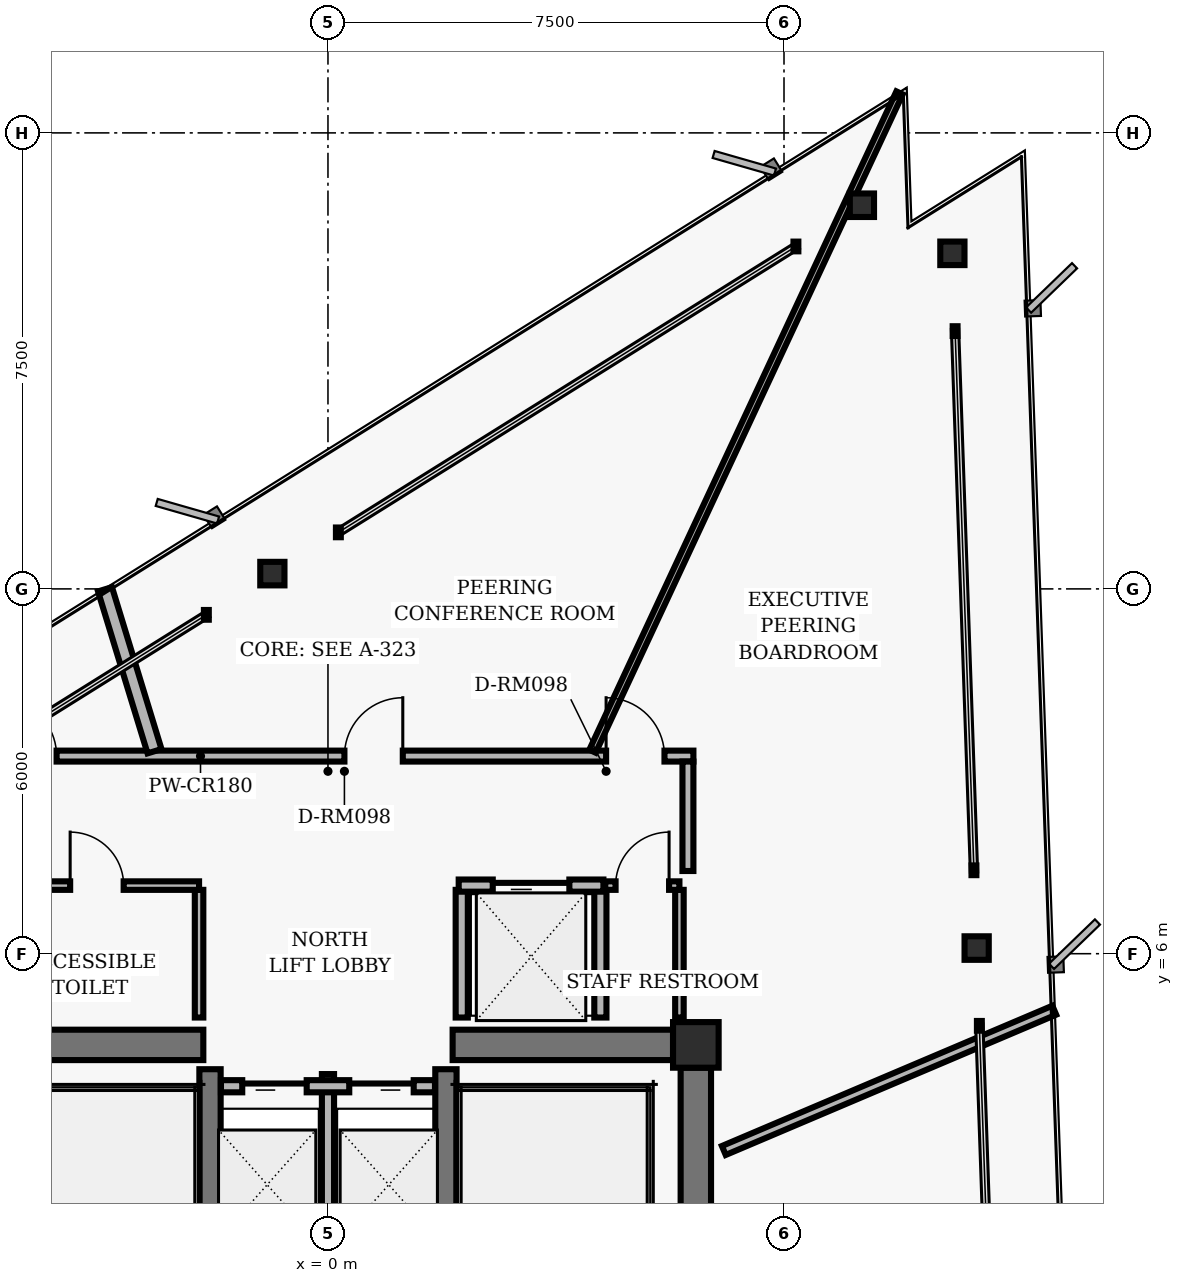
"""IFC4 building model, lengths in metres.
Left out: names, types, materials, properties, quantities, classifications, styles, units other than length and angle.
Written with IfcOpenShell. Run it as: python <this file> out.ifc"""

import sys

from ifc_helpers import new_model, si_unit, direction, frame, frame_2d, origin, origin_2d, place, context, subcontext, project, spatial, rectangle, hollow_rectangle, i_section, extrude, element, fill, save


model = new_model("IFC4")
c1 = context("Model", 3, precision=1e-05, world=origin(), true_north=direction((0.0, 1.0)))
c2 = subcontext(c1, "Body", "Model", "MODEL_VIEW")
j1 = project(units=[si_unit("LENGTHUNIT", "METRE"), si_unit("PLANEANGLEUNIT", "RADIAN")], contexts=[c1])
p1 = place(None, origin())
s1 = spatial("IfcSite", under=j1, at=p1, CompositionType="ELEMENT")
p2 = place(p1, origin())
s2 = spatial("IfcBuilding", under=s1, at=p2, CompositionType="ELEMENT")
p3 = place(p2, frame((0.0, 0.0, 196.64)))
s3 = spatial("IfcBuildingStorey", under=s2, at=p3, CompositionType="ELEMENT", Elevation=196.64)
p4 = place(p3, frame((6.05, 4.5, 0.0), z_axis=(0.0, 0.0, 1.0), x_axis=(1.0, 0.0, 0.0)))
e1 = element("IfcColumn", 1, at=p4, inside=s3, PredefinedType="COLUMN", context=c2, shape_type="SweptSolid", body=[
    extrude(hollow_rectangle(XDim=0.75, YDim=0.75, WallThickness=0.05, InnerFilletRadius=0.02, OuterFilletRadius=0.04, at=origin_2d()), origin(), (0.0, 0.0, 1.0), 3.04),
])
p5 = place(p3, frame((6.05, 0.375, 0.0), z_axis=(0.0, 0.0, 1.0), x_axis=(0.0, 1.0, 0.0)))
e2 = element("IfcWall", 2, at=p5, inside=s3, PredefinedType="SHEAR", context=c2, shape_type="SweptSolid", body=[
    extrude(rectangle(XDim=3.75, YDim=0.5, at=frame_2d((1.875, 0.0))), origin(), (0.0, 0.0, 1.0), 2.798),
])
for number, where, z_axis, x_axis in (
    (3, (-1.94, -4.1, 0.0), (0.0, 0.0, 1.0), (0.0, 1.0, 0.0)),
    (4, (1.94, -4.1, 0.0), (0.0, 0.0, 1.0), (0.0, 1.0, 0.0)),
):
    element("IfcWall", number, at=place(p3, frame(where, z_axis=z_axis, x_axis=x_axis)), inside=s3, PredefinedType="SHEAR", context=c2, shape_type="SweptSolid", body=[
        extrude(rectangle(XDim=8.2, YDim=0.35, at=frame_2d((4.1, 0.0))), origin(), (0.0, 0.0, 1.0), 2.798),
    ])
for number, where, z_axis, x_axis in (
    (5, (-5.675, 4.5, 0.0), (0.0, 0.0, 1.0), (1.0, 0.0, 0.0)),
    (6, (2.05, 4.5, 0.0), (0.0, 0.0, 1.0), (1.0, 0.0, 0.0)),
):
    element("IfcWall", number, at=place(p3, frame(where, z_axis=z_axis, x_axis=x_axis)), inside=s3, PredefinedType="SHEAR", context=c2, shape_type="SweptSolid", body=[
        extrude(rectangle(XDim=3.625, YDim=0.5, at=frame_2d((1.812, 0.0))), origin(), (0.0, 0.0, 1.0), 2.798),
    ])
for number, where, z_axis, x_axis in (
    (7, (10.668, 6.093, 0.0), (0.0, 0.0, 1.0), (1.0, 0.0, 0.0)),
    (8, (10.269, 17.519, 0.0), (0.0, 0.0, 1.0), (1.0, 0.0, 0.0)),
    (9, (8.781, 18.31, 0.0), (0.0, 0.0, 1.0), (1.0, 0.0, 0.0)),
    (10, (-0.915, 12.251, 0.0), (0.0, 0.0, 1.0), (1.0, 0.0, 0.0)),
):
    element("IfcColumn", number, at=place(p3, frame(where, z_axis=z_axis, x_axis=x_axis)), inside=s3, PredefinedType="COLUMN", context=c2, shape_type="SweptSolid", body=[
        extrude(i_section(OverallWidth=0.398, OverallDepth=0.387, WebThickness=0.021, FlangeThickness=0.033, FilletRadius=0.018, at=origin_2d()), origin(), (0.0, 0.0, 1.0), 3.04),
    ])
p6 = place(p3, frame((0.0, 1.25, 0.0), z_axis=(0.0, 0.0, 1.0), x_axis=(0.0, 1.0, 0.0)))
e11 = element("IfcWall", 11, at=p6, inside=s3, PredefinedType="PARTITIONING", context=c2, shape_type="SweptSolid", body=[
    extrude(rectangle(XDim=2.77, YDim=0.2, at=frame_2d((1.385, 0.0))), origin(), (0.0, 0.0, 1.0), 2.773),
])
p7 = place(p3, frame((-1.76, 3.82, 0.0), z_axis=(0.0, 0.0, 1.0), x_axis=(1.0, 0.0, 0.0)))
e12 = element("IfcWall", 12, at=p7, inside=s3, PredefinedType="PARTITIONING", context=c2, shape_type="SweptSolid", body=[
    extrude(rectangle(XDim=3.52, YDim=0.2, at=frame_2d((1.76, 0.0))), origin(), (0.0, 0.0, 1.0), 2.773),
])
p8 = place(p7, frame((0.35, 0.0, 0.0)))
e13 = element("IfcOpeningElement", 13, at=p8, cuts=e12, PredefinedType="OPENING", context=c2, shape_type="SweptSolid", body=[
    extrude(rectangle(XDim=1.06, YDim=2.04, at=frame_2d((0.53, 1.02))), frame((0.0, 0.11, 0.0), z_axis=(0.0, -1.0, 0.0), x_axis=(1.0, 0.0, 0.0)), (0.0, 0.0, 1.0), 0.22),
])
p9 = place(p7, frame((2.11, 0.0, 0.0)))
e14 = element("IfcOpeningElement", 14, at=p9, cuts=e12, PredefinedType="OPENING", context=c2, shape_type="SweptSolid", body=[
    extrude(rectangle(XDim=1.06, YDim=2.04, at=frame_2d((0.53, 1.02))), frame((0.0, 0.11, 0.0), z_axis=(0.0, -1.0, 0.0), x_axis=(1.0, 0.0, 0.0)), (0.0, 0.0, 1.0), 0.22),
])
for number, where, z_axis, x_axis in (
    (15, (2.2, 4.95, 0.0), (0.0, 0.0, 1.0), (0.0, 1.0, 0.0)),
    (16, (4.48, 4.95, 0.0), (0.0, 0.0, 1.0), (0.0, 1.0, 0.0)),
):
    element("IfcWall", number, at=place(p3, frame(where, z_axis=z_axis, x_axis=x_axis)), inside=s3, PredefinedType="PARTITIONING", context=c2, shape_type="SweptSolid", body=[
        extrude(rectangle(XDim=2.1, YDim=0.2, at=frame_2d((1.05, 0.0))), origin(), (0.0, 0.0, 1.0), 2.773),
    ])
p10 = place(p3, frame((2.15, 7.12, 0.0), z_axis=(0.0, 0.0, 1.0), x_axis=(1.0, 0.0, 0.0)))
e17 = element("IfcWall", 17, at=p10, inside=s3, PredefinedType="PARTITIONING", context=c2, shape_type="SweptSolid", body=[
    extrude(rectangle(XDim=2.38, YDim=0.2, at=frame_2d((1.19, 0.0))), origin(), (0.0, 0.0, 1.0), 2.773),
])
p11 = place(p10, frame((0.56, 0.0, 0.0)))
e18 = element("IfcOpeningElement", 18, at=p11, cuts=e17, PredefinedType="OPENING", context=c2, shape_type="SweptSolid", body=[
    extrude(rectangle(XDim=1.26, YDim=2.06, at=frame_2d((0.63, 1.03))), frame((0.0, 0.11, 0.0), z_axis=(0.0, -1.0, 0.0), x_axis=(1.0, 0.0, 0.0)), (0.0, 0.0, 1.0), 0.22),
])
p12 = place(p3, frame((-2.12, 4.95, 0.0), z_axis=(0.0, 0.0, 1.0), x_axis=(0.0, 1.0, 0.0)))
e19 = element("IfcWall", 19, at=p12, inside=s3, PredefinedType="PARTITIONING", context=c2, shape_type="SweptSolid", body=[
    extrude(rectangle(XDim=2.1, YDim=0.14, at=frame_2d((1.05, 0.0))), origin(), (0.0, 0.0, 1.0), 2.773),
])
p13 = place(p3, frame((-5.48, 7.12, 0.0), z_axis=(0.0, 0.0, 1.0), x_axis=(1.0, 0.0, 0.0)))
e20 = element("IfcWall", 20, at=p13, inside=s3, PredefinedType="PARTITIONING", context=c2, shape_type="SweptSolid", body=[
    extrude(rectangle(XDim=3.36, YDim=0.14, at=frame_2d((1.68, 0.0))), origin(), (0.0, 0.0, 1.0), 2.773),
])
p14 = place(p13, frame((1.24, 0.0, 0.0)))
e21 = element("IfcOpeningElement", 21, at=p14, cuts=e20, PredefinedType="OPENING", context=c2, shape_type="SweptSolid", body=[
    extrude(rectangle(XDim=0.88, YDim=2.02, at=frame_2d((0.44, 1.01))), frame((0.0, 0.08, 0.0), z_axis=(0.0, -1.0, 0.0), x_axis=(1.0, 0.0, 0.0)), (0.0, 0.0, 1.0), 0.16),
])
p15 = place(p3, frame((5.78, 4.95, 0.0), z_axis=(0.0, 0.0, 1.0), x_axis=(0.0, 1.0, 0.0)))
e22 = element("IfcWall", 22, at=p15, inside=s3, PredefinedType="PARTITIONING", context=c2, shape_type="SweptSolid", body=[
    extrude(rectangle(XDim=2.1, YDim=0.14, at=frame_2d((1.05, 0.0))), origin(), (0.0, 0.0, 1.0), 2.253),
])
p16 = place(p3, frame((4.56, 7.12, 0.0), z_axis=(0.0, 0.0, 1.0), x_axis=(1.0, 0.0, 0.0)))
e23 = element("IfcWall", 23, at=p16, inside=s3, PredefinedType="PARTITIONING", context=c2, shape_type="SweptSolid", body=[
    extrude(rectangle(XDim=1.22, YDim=0.14, at=frame_2d((0.61, 0.0))), origin(), (0.0, 0.0, 1.0), 2.773),
])
p17 = place(p16, frame((0.17, 0.0, 0.0)))
e24 = element("IfcOpeningElement", 24, at=p17, cuts=e23, PredefinedType="OPENING", context=c2, shape_type="SweptSolid", body=[
    extrude(rectangle(XDim=0.88, YDim=2.02, at=frame_2d((0.44, 1.01))), frame((0.0, 0.08, 0.0), z_axis=(0.0, -1.0, 0.0), x_axis=(1.0, 0.0, 0.0)), (0.0, 0.0, 1.0), 0.16),
])
p18 = place(p3, frame((-7.29, 9.25, 0.0), z_axis=(0.0, 0.0, 1.0), x_axis=(1.0, 0.0, 0.0)))
e25 = element("IfcWall", 25, at=p18, inside=s3, PredefinedType="PARTITIONING", context=c2, shape_type="SweptSolid", body=[
    extrude(rectangle(XDim=13.3, YDim=0.18, at=frame_2d((6.65, 0.0))), origin(), (0.0, 0.0, 1.0), 2.773),
])
p19 = place(p18, frame((11.864, 0.0, 0.0)))
e26 = element("IfcOpeningElement", 26, at=p19, cuts=e25, PredefinedType="OPENING", context=c2, shape_type="SweptSolid", body=[
    extrude(rectangle(XDim=0.96, YDim=2.02, at=frame_2d((0.48, 1.01))), frame((0.0, 0.1, 0.0), z_axis=(0.0, -1.0, 0.0), x_axis=(1.0, 0.0, 0.0)), (0.0, 0.0, 1.0), 0.2),
])
p20 = place(p18, frame((7.561, 0.0, 0.0)))
e27 = element("IfcOpeningElement", 27, at=p20, cuts=e25, PredefinedType="OPENING", context=c2, shape_type="SweptSolid", body=[
    extrude(rectangle(XDim=0.96, YDim=2.02, at=frame_2d((0.48, 1.01))), frame((0.0, 0.1, 0.0), z_axis=(0.0, -1.0, 0.0), x_axis=(1.0, 0.0, 0.0)), (0.0, 0.0, 1.0), 0.2),
])
p21 = place(p18, frame((1.867, 0.0, 0.0)))
e28 = element("IfcOpeningElement", 28, at=p21, cuts=e25, PredefinedType="OPENING", context=c2, shape_type="SweptSolid", body=[
    extrude(rectangle(XDim=0.96, YDim=2.02, at=frame_2d((0.48, 1.01))), frame((0.0, 0.1, 0.0), z_axis=(0.0, -1.0, 0.0), x_axis=(1.0, 0.0, 0.0)), (0.0, 0.0, 1.0), 0.2),
])
p22 = place(p3, frame((5.92, 9.16, 0.0), z_axis=(0.0, 0.0, 1.0), x_axis=(0.0, -1.0, 0.0)))
e29 = element("IfcWall", 29, at=p22, inside=s3, PredefinedType="PARTITIONING", context=c2, shape_type="SweptSolid", body=[
    extrude(rectangle(XDim=1.8, YDim=0.18, at=frame_2d((0.9, 0.0))), origin(), (0.0, 0.0, 1.0), 2.773),
])
p23 = place(p3, frame((6.51, 2.763, 0.0), z_axis=(0.0, 0.0, 1.0), x_axis=(0.920487144923, 0.390772844543, 0.0)))
e30 = element("IfcWall", 30, at=p23, inside=s3, PredefinedType="PARTITIONING", context=c2, shape_type="SweptSolid", body=[
    extrude(rectangle(XDim=5.904, YDim=0.16, at=frame_2d((2.952, 0.0))), origin(), (0.0, 0.0, 1.0), 2.773),
])
p24 = place(p3, frame((4.351, 9.33, 0.0), z_axis=(0.0, 0.0, 1.0), x_axis=(0.422616983209, 0.906308383225, 0.0)))
e31 = element("IfcWall", 31, at=p24, inside=s3, PredefinedType="MOVABLE", context=c2, shape_type="SweptSolid", body=[
    extrude(rectangle(XDim=11.948, YDim=0.115, at=frame_2d((5.974, 0.0))), origin(), (0.0, 0.0, 1.0), 2.253),
])
p25 = place(p3, frame((-2.853, 9.33, 0.0), z_axis=(0.0, 0.0, 1.0), x_axis=(-0.292329881005, 0.956317541757, 0.0)))
e32 = element("IfcWall", 32, at=p25, inside=s3, PredefinedType="PARTITIONING", context=c2, shape_type="SweptSolid", body=[
    extrude(rectangle(XDim=2.785, YDim=0.24, at=frame_2d((1.393, 0.0))), origin(), (0.0, 0.0, 1.0), 2.773),
])
p26 = place(p8, origin())
e33 = element("IfcDoor", 33, at=p26, inside=s3, OperationType="SLIDING_TO_LEFT", PredefinedType="DOOR", context=c2, shape_type="SweptSolid", body=[
    extrude(rectangle(XDim=1.06, YDim=2.04, at=frame_2d((0.53, 1.02))), frame((0.0, 0.025, 0.0), z_axis=(0.0, -1.0, 0.0), x_axis=(1.0, 0.0, 0.0)), (0.0, 0.0, 1.0), 0.05),
])
fill(e13, e33)
p27 = place(p9, origin())
e34 = element("IfcDoor", 34, at=p27, inside=s3, OperationType="SLIDING_TO_RIGHT", PredefinedType="DOOR", context=c2, shape_type="SweptSolid", body=[
    extrude(rectangle(XDim=1.06, YDim=2.04, at=frame_2d((0.53, 1.02))), frame((0.0, 0.025, 0.0), z_axis=(0.0, -1.0, 0.0), x_axis=(1.0, 0.0, 0.0)), (0.0, 0.0, 1.0), 0.05),
])
fill(e14, e34)
p28 = place(p11, origin())
e35 = element("IfcDoor", 35, at=p28, inside=s3, OperationType="SLIDING_TO_LEFT", PredefinedType="DOOR", context=c2, shape_type="SweptSolid", body=[
    extrude(rectangle(XDim=1.26, YDim=2.06, at=frame_2d((0.63, 1.03))), frame((0.0, 0.025, 0.0), z_axis=(0.0, -1.0, 0.0), x_axis=(1.0, 0.0, 0.0)), (0.0, 0.0, 1.0), 0.05),
])
fill(e18, e35)
p29 = place(p14, origin())
e36 = element("IfcDoor", 36, at=p29, inside=s3, OperationType="SINGLE_SWING_LEFT", PredefinedType="DOOR", context=c2, shape_type="SweptSolid", body=[
    extrude(rectangle(XDim=0.88, YDim=2.02, at=frame_2d((0.44, 1.01))), frame((0.0, 0.025, 0.0), z_axis=(0.0, -1.0, 0.0), x_axis=(1.0, 0.0, 0.0)), (0.0, 0.0, 1.0), 0.05),
])
fill(e21, e36)
p30 = place(p17, origin())
e37 = element("IfcDoor", 37, at=p30, inside=s3, OperationType="SINGLE_SWING_RIGHT", PredefinedType="DOOR", context=c2, shape_type="SweptSolid", body=[
    extrude(rectangle(XDim=0.88, YDim=2.02, at=frame_2d((0.44, 1.01))), frame((0.0, 0.025, 0.0), z_axis=(0.0, -1.0, 0.0), x_axis=(1.0, 0.0, 0.0)), (0.0, 0.0, 1.0), 0.05),
])
fill(e24, e37)
p31 = place(p19, origin())
e38 = element("IfcDoor", 38, at=p31, inside=s3, OperationType="SINGLE_SWING_LEFT", PredefinedType="DOOR", context=c2, shape_type="SweptSolid", body=[
    extrude(rectangle(XDim=0.96, YDim=2.02, at=frame_2d((0.48, 1.01))), frame((0.0, 0.025, 0.0), z_axis=(0.0, -1.0, 0.0), x_axis=(1.0, 0.0, 0.0)), (0.0, 0.0, 1.0), 0.05),
])
fill(e26, e38)
p32 = place(p20, origin())
e39 = element("IfcDoor", 39, at=p32, inside=s3, OperationType="SINGLE_SWING_RIGHT", PredefinedType="DOOR", context=c2, shape_type="SweptSolid", body=[
    extrude(rectangle(XDim=0.96, YDim=2.02, at=frame_2d((0.48, 1.01))), frame((0.0, 0.025, 0.0), z_axis=(0.0, -1.0, 0.0), x_axis=(1.0, 0.0, 0.0)), (0.0, 0.0, 1.0), 0.05),
])
fill(e27, e39)
p33 = place(p21, origin())
e40 = element("IfcDoor", 40, at=p33, inside=s3, OperationType="SINGLE_SWING_LEFT", PredefinedType="DOOR", context=c2, shape_type="SweptSolid", body=[
    extrude(rectangle(XDim=0.96, YDim=2.02, at=frame_2d((0.48, 1.01))), frame((0.0, 0.025, 0.0), z_axis=(0.0, -1.0, 0.0), x_axis=(1.0, 0.0, 0.0)), (0.0, 0.0, 1.0), 0.05),
])
fill(e28, e40)
save(model, sys.argv[1])
